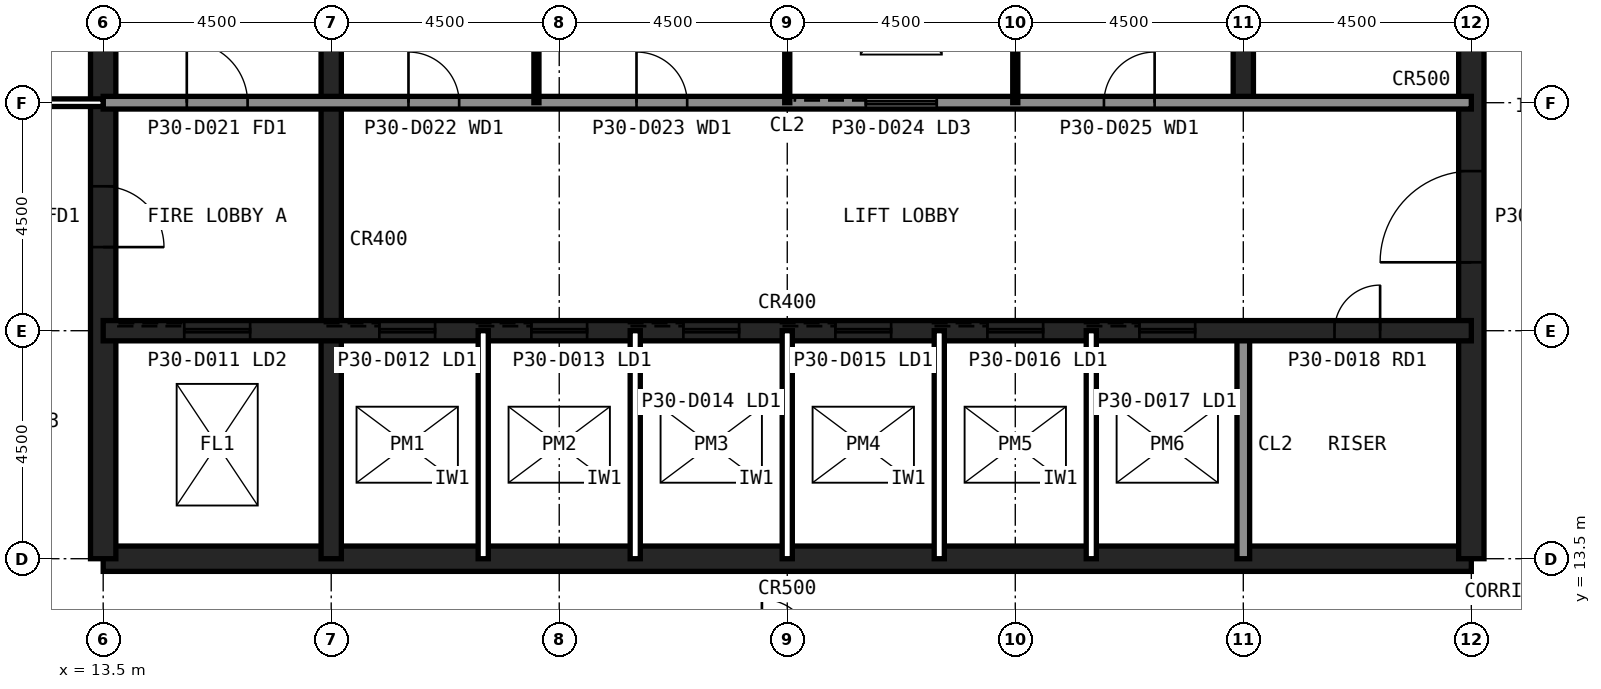
"""IFC4 building model, lengths in metres.
Left out: names, types, materials, properties, quantities, classifications, styles, units other than length and angle.
Written with IfcOpenShell. Run it as: python <this file> out.ifc"""

import sys

from ifc_helpers import new_model, si_unit, direction, frame, frame_2d, origin, place, context, subcontext, project, spatial, rectangle, extrude, element, fill, save


model = new_model("IFC4")
c1 = context("Model", 3, precision=1e-05, world=origin(), true_north=direction((0.0, 1.0)))
c2 = subcontext(c1, "Body", "Model", "MODEL_VIEW")
j1 = project(units=[si_unit("LENGTHUNIT", "METRE"), si_unit("PLANEANGLEUNIT", "RADIAN")], contexts=[c1])
p1 = place(None, origin())
s1 = spatial("IfcSite", under=j1, at=p1, CompositionType="ELEMENT")
p2 = place(p1, origin())
s2 = spatial("IfcBuilding", under=s1, at=p2, CompositionType="ELEMENT")
p3 = place(p2, frame((0.0, 0.0, 127.6)))
s3 = spatial("IfcBuildingStorey", under=s2, at=p3, CompositionType="ELEMENT", Elevation=127.6)
p4 = place(p3, frame((13.5, 13.5, 0.0), z_axis=(0.0, 0.0, 1.0), x_axis=(1.0, 0.0, 0.0)))
e1 = element("IfcWall", 1, at=p4, inside=s3, PredefinedType="SHEAR", context=c2, shape_type="SweptSolid", body=[
    extrude(rectangle(XDim=27.0, YDim=0.5, at=frame_2d((13.5, 0.0))), origin(), (0.0, 0.0, 1.0), 4.0),
])
p5 = place(p3, frame((40.5, 13.5, 0.0), z_axis=(0.0, 0.0, 1.0), x_axis=(0.0, 1.0, 0.0)))
e2 = element("IfcWall", 2, at=p5, inside=s3, PredefinedType="SHEAR", context=c2, shape_type="SweptSolid", body=[
    extrude(rectangle(XDim=27.0, YDim=0.5, at=frame_2d((13.5, 0.0))), origin(), (0.0, 0.0, 1.0), 4.0),
])
p6 = place(p5, frame((5.85, 0.0, 0.0)))
e3 = element("IfcOpeningElement", 3, at=p6, cuts=e2, PredefinedType="OPENING", context=c2, shape_type="SweptSolid", body=[
    extrude(rectangle(XDim=1.8, YDim=2.1, at=frame_2d((0.9, 1.05))), frame((0.0, 0.26, 0.0), z_axis=(0.0, -1.0, 0.0), x_axis=(1.0, 0.0, 0.0)), (0.0, 0.0, 1.0), 0.52),
])
p7 = place(p5, frame((19.65, 0.0, 0.0)))
e4 = element("IfcOpeningElement", 4, at=p7, cuts=e2, PredefinedType="OPENING", context=c2, shape_type="SweptSolid", body=[
    extrude(rectangle(XDim=1.2, YDim=2.1, at=frame_2d((0.6, 1.05))), frame((0.0, 0.26, 0.0), z_axis=(0.0, -1.0, 0.0), x_axis=(1.0, 0.0, 0.0)), (0.0, 0.0, 1.0), 0.52),
])
p8 = place(p3, frame((13.5, 40.5, 0.0), z_axis=(0.0, 0.0, 1.0), x_axis=(0.0, -1.0, 0.0)))
e5 = element("IfcWall", 5, at=p8, inside=s3, PredefinedType="SHEAR", context=c2, shape_type="SweptSolid", body=[
    extrude(rectangle(XDim=27.0, YDim=0.5, at=frame_2d((13.5, 0.0))), origin(), (0.0, 0.0, 1.0), 4.0),
])
p9 = place(p8, frame((19.65, 0.0, 0.0)))
e6 = element("IfcOpeningElement", 6, at=p9, cuts=e5, PredefinedType="OPENING", context=c2, shape_type="SweptSolid", body=[
    extrude(rectangle(XDim=1.2, YDim=2.1, at=frame_2d((0.6, 1.05))), frame((0.0, 0.26, 0.0), z_axis=(0.0, -1.0, 0.0), x_axis=(1.0, 0.0, 0.0)), (0.0, 0.0, 1.0), 0.52),
])
p10 = place(p8, frame((5.85, 0.0, 0.0)))
e7 = element("IfcOpeningElement", 7, at=p10, cuts=e5, PredefinedType="OPENING", context=c2, shape_type="SweptSolid", body=[
    extrude(rectangle(XDim=1.8, YDim=2.1, at=frame_2d((0.9, 1.05))), frame((0.0, 0.26, 0.0), z_axis=(0.0, -1.0, 0.0), x_axis=(1.0, 0.0, 0.0)), (0.0, 0.0, 1.0), 0.52),
])
p11 = place(p3, frame((18.0, 13.5, 0.0), z_axis=(0.0, 0.0, 1.0), x_axis=(0.0, 1.0, 0.0)))
e8 = element("IfcWall", 8, at=p11, inside=s3, PredefinedType="SHEAR", context=c2, shape_type="SweptSolid", body=[
    extrude(rectangle(XDim=18.0, YDim=0.4, at=frame_2d((9.0, 0.0))), origin(), (0.0, 0.0, 1.0), 4.0),
])
p12 = place(p3, frame((36.0, 13.5, 0.0), z_axis=(0.0, 0.0, 1.0), x_axis=(0.0, 1.0, 0.0)))
e9 = element("IfcWall", 9, at=p12, inside=s3, PredefinedType="SOLIDWALL", context=c2, shape_type="SweptSolid", body=[
    extrude(rectangle(XDim=4.5, YDim=0.25, at=frame_2d((2.25, 0.0))), origin(), (0.0, 0.0, 1.0), 3.84),
])
p13 = place(p3, frame((36.0, 22.5, 0.0), z_axis=(0.0, 0.0, 1.0), x_axis=(0.0, 1.0, 0.0)))
e10 = element("IfcWall", 10, at=p13, inside=s3, PredefinedType="SHEAR", context=c2, shape_type="SweptSolid", body=[
    extrude(rectangle(XDim=18.0, YDim=0.4, at=frame_2d((9.0, 0.0))), origin(), (0.0, 0.0, 1.0), 4.0),
])
p14 = place(p3, frame((13.5, 18.0, 0.0), z_axis=(0.0, 0.0, 1.0), x_axis=(1.0, 0.0, 0.0)))
e11 = element("IfcWall", 11, at=p14, inside=s3, PredefinedType="SHEAR", context=c2, shape_type="SweptSolid", body=[
    extrude(rectangle(XDim=27.0, YDim=0.4, at=frame_2d((13.5, 0.0))), origin(), (0.0, 0.0, 1.0), 4.0),
])
p15 = place(p14, frame((24.3, 0.0, 0.0)))
e12 = element("IfcOpeningElement", 12, at=p15, cuts=e11, PredefinedType="OPENING", context=c2, shape_type="SweptSolid", body=[
    extrude(rectangle(XDim=0.9, YDim=2.1, at=frame_2d((0.45, 1.05))), frame((0.0, 0.21, 0.0), z_axis=(0.0, -1.0, 0.0), x_axis=(1.0, 0.0, 0.0)), (0.0, 0.0, 1.0), 0.42),
])
p16 = place(p14, frame((5.45, 0.0, 0.0)))
e13 = element("IfcOpeningElement", 13, at=p16, cuts=e11, PredefinedType="OPENING", context=c2, shape_type="SweptSolid", body=[
    extrude(rectangle(XDim=1.1, YDim=2.1, at=frame_2d((0.55, 1.05))), frame((0.0, 0.21, 0.0), z_axis=(0.0, -1.0, 0.0), x_axis=(1.0, 0.0, 0.0)), (0.0, 0.0, 1.0), 0.42),
])
p17 = place(p14, frame((8.45, 0.0, 0.0)))
e14 = element("IfcOpeningElement", 14, at=p17, cuts=e11, PredefinedType="OPENING", context=c2, shape_type="SweptSolid", body=[
    extrude(rectangle(XDim=1.1, YDim=2.1, at=frame_2d((0.55, 1.05))), frame((0.0, 0.21, 0.0), z_axis=(0.0, -1.0, 0.0), x_axis=(1.0, 0.0, 0.0)), (0.0, 0.0, 1.0), 0.42),
])
p18 = place(p14, frame((11.45, 0.0, 0.0)))
e15 = element("IfcOpeningElement", 15, at=p18, cuts=e11, PredefinedType="OPENING", context=c2, shape_type="SweptSolid", body=[
    extrude(rectangle(XDim=1.1, YDim=2.1, at=frame_2d((0.55, 1.05))), frame((0.0, 0.21, 0.0), z_axis=(0.0, -1.0, 0.0), x_axis=(1.0, 0.0, 0.0)), (0.0, 0.0, 1.0), 0.42),
])
p19 = place(p14, frame((14.45, 0.0, 0.0)))
e16 = element("IfcOpeningElement", 16, at=p19, cuts=e11, PredefinedType="OPENING", context=c2, shape_type="SweptSolid", body=[
    extrude(rectangle(XDim=1.1, YDim=2.1, at=frame_2d((0.55, 1.05))), frame((0.0, 0.21, 0.0), z_axis=(0.0, -1.0, 0.0), x_axis=(1.0, 0.0, 0.0)), (0.0, 0.0, 1.0), 0.42),
])
p20 = place(p14, frame((17.45, 0.0, 0.0)))
e17 = element("IfcOpeningElement", 17, at=p20, cuts=e11, PredefinedType="OPENING", context=c2, shape_type="SweptSolid", body=[
    extrude(rectangle(XDim=1.1, YDim=2.1, at=frame_2d((0.55, 1.05))), frame((0.0, 0.21, 0.0), z_axis=(0.0, -1.0, 0.0), x_axis=(1.0, 0.0, 0.0)), (0.0, 0.0, 1.0), 0.42),
])
p21 = place(p14, frame((20.45, 0.0, 0.0)))
e18 = element("IfcOpeningElement", 18, at=p21, cuts=e11, PredefinedType="OPENING", context=c2, shape_type="SweptSolid", body=[
    extrude(rectangle(XDim=1.1, YDim=2.1, at=frame_2d((0.55, 1.05))), frame((0.0, 0.21, 0.0), z_axis=(0.0, -1.0, 0.0), x_axis=(1.0, 0.0, 0.0)), (0.0, 0.0, 1.0), 0.42),
])
p22 = place(p14, frame((1.6, 0.0, 0.0)))
e19 = element("IfcOpeningElement", 19, at=p22, cuts=e11, PredefinedType="OPENING", context=c2, shape_type="SweptSolid", body=[
    extrude(rectangle(XDim=1.3, YDim=2.2, at=frame_2d((0.65, 1.1))), frame((0.0, 0.21, 0.0), z_axis=(0.0, -1.0, 0.0), x_axis=(1.0, 0.0, 0.0)), (0.0, 0.0, 1.0), 0.42),
])
p23 = place(p3, frame((13.5, 22.5, 0.0), z_axis=(0.0, 0.0, 1.0), x_axis=(1.0, 0.0, 0.0)))
e20 = element("IfcWall", 20, at=p23, inside=s3, PredefinedType="SOLIDWALL", context=c2, shape_type="SweptSolid", body=[
    extrude(rectangle(XDim=27.0, YDim=0.25, at=frame_2d((13.5, 0.0))), origin(), (0.0, 0.0, 1.0), 3.84),
])
p24 = place(p23, frame((1.65, 0.0, 0.0)))
e21 = element("IfcOpeningElement", 21, at=p24, cuts=e20, PredefinedType="OPENING", context=c2, shape_type="SweptSolid", body=[
    extrude(rectangle(XDim=1.2, YDim=2.1, at=frame_2d((0.6, 1.05))), frame((0.0, 0.135, 0.0), z_axis=(0.0, -1.0, 0.0), x_axis=(1.0, 0.0, 0.0)), (0.0, 0.0, 1.0), 0.27),
])
p25 = place(p23, frame((6.025, 0.0, 0.0)))
e22 = element("IfcOpeningElement", 22, at=p25, cuts=e20, PredefinedType="OPENING", context=c2, shape_type="SweptSolid", body=[
    extrude(rectangle(XDim=1.0, YDim=2.1, at=frame_2d((0.5, 1.05))), frame((0.0, 0.135, 0.0), z_axis=(0.0, -1.0, 0.0), x_axis=(1.0, 0.0, 0.0)), (0.0, 0.0, 1.0), 0.27),
])
p26 = place(p23, frame((10.525, 0.0, 0.0)))
e23 = element("IfcOpeningElement", 23, at=p26, cuts=e20, PredefinedType="OPENING", context=c2, shape_type="SweptSolid", body=[
    extrude(rectangle(XDim=1.0, YDim=2.1, at=frame_2d((0.5, 1.05))), frame((0.0, 0.135, 0.0), z_axis=(0.0, -1.0, 0.0), x_axis=(1.0, 0.0, 0.0)), (0.0, 0.0, 1.0), 0.27),
])
p27 = place(p23, frame((19.75, 0.0, 0.0)))
e24 = element("IfcOpeningElement", 24, at=p27, cuts=e20, PredefinedType="OPENING", context=c2, shape_type="SweptSolid", body=[
    extrude(rectangle(XDim=1.0, YDim=2.1, at=frame_2d((0.5, 1.05))), frame((0.0, 0.135, 0.0), z_axis=(0.0, -1.0, 0.0), x_axis=(1.0, 0.0, 0.0)), (0.0, 0.0, 1.0), 0.27),
])
p28 = place(p23, frame((15.05, 0.0, 0.0)))
e25 = element("IfcOpeningElement", 25, at=p28, cuts=e20, PredefinedType="OPENING", context=c2, shape_type="SweptSolid", body=[
    extrude(rectangle(XDim=1.4, YDim=2.4, at=frame_2d((0.7, 1.2))), frame((0.0, 0.135, 0.0), z_axis=(0.0, -1.0, 0.0), x_axis=(1.0, 0.0, 0.0)), (0.0, 0.0, 1.0), 0.27),
])
for number, where, z_axis, x_axis in (
    (26, (21.0, 13.5, 0.0), (0.0, 0.0, 1.0), (0.0, 1.0, 0.0)),
    (27, (24.0, 13.5, 0.0), (0.0, 0.0, 1.0), (0.0, 1.0, 0.0)),
    (28, (27.0, 13.5, 0.0), (0.0, 0.0, 1.0), (0.0, 1.0, 0.0)),
    (29, (30.0, 13.5, 0.0), (0.0, 0.0, 1.0), (0.0, 1.0, 0.0)),
    (30, (33.0, 13.5, 0.0), (0.0, 0.0, 1.0), (0.0, 1.0, 0.0)),
):
    element("IfcWall", number, at=place(p3, frame(where, z_axis=z_axis, x_axis=x_axis)), inside=s3, PredefinedType="PARTITIONING", context=c2, shape_type="SweptSolid", body=[
        extrude(rectangle(XDim=4.5, YDim=0.2, at=frame_2d((2.25, 0.0))), origin(), (0.0, 0.0, 1.0), 3.84),
    ])
for number, where, z_axis, x_axis in (
    (31, (22.05, 22.5, 0.0), (0.0, 0.0, 1.0), (0.0, 1.0, 0.0)),
    (32, (27.0, 22.5, 0.0), (0.0, 0.0, 1.0), (0.0, 1.0, 0.0)),
    (33, (31.5, 22.5, 0.0), (0.0, 0.0, 1.0), (0.0, 1.0, 0.0)),
):
    element("IfcWall", number, at=place(p3, frame(where, z_axis=z_axis, x_axis=x_axis)), inside=s3, PredefinedType="PLUMBINGWALL", context=c2, shape_type="SweptSolid", body=[
        extrude(rectangle(XDim=9.0, YDim=0.1, at=frame_2d((4.5, 0.0))), origin(), (0.0, 0.0, 1.0), 3.84),
    ])
p29 = place(p3, frame((6.75, 22.5, 0.0), z_axis=(0.0, 0.0, 1.0), x_axis=(1.0, 0.0, 0.0)))
e34 = element("IfcWall", 34, at=p29, inside=s3, PredefinedType="PARTITIONING", context=c2, shape_type="SweptSolid", body=[
    extrude(rectangle(XDim=6.75, YDim=0.15, at=frame_2d((3.375, 0.0))), origin(), (0.0, 0.0, 1.0), 2.989),
])
p30 = place(p29, frame((2.875, 0.0, 0.0)))
e35 = element("IfcOpeningElement", 35, at=p30, cuts=e34, PredefinedType="OPENING", context=c2, shape_type="SweptSolid", body=[
    extrude(rectangle(XDim=1.0, YDim=2.1, at=frame_2d((0.5, 1.05))), frame((0.0, 0.085, 0.0), z_axis=(0.0, -1.0, 0.0), x_axis=(1.0, 0.0, 0.0)), (0.0, 0.0, 1.0), 0.17),
])
p31 = place(p9, origin())
e36 = element("IfcDoor", 36, at=p31, inside=s3, OperationType="SINGLE_SWING_RIGHT", PredefinedType="DOOR", context=c2, shape_type="SweptSolid", body=[
    extrude(rectangle(XDim=1.2, YDim=2.1, at=frame_2d((0.6, 1.05))), frame((0.0, 0.025, 0.0), z_axis=(0.0, -1.0, 0.0), x_axis=(1.0, 0.0, 0.0)), (0.0, 0.0, 1.0), 0.05),
])
fill(e6, e36)
p32 = place(p6, origin())
e37 = element("IfcDoor", 37, at=p32, inside=s3, OperationType="SINGLE_SWING_LEFT", PredefinedType="DOOR", context=c2, shape_type="SweptSolid", body=[
    extrude(rectangle(XDim=1.8, YDim=2.1, at=frame_2d((0.9, 1.05))), frame((0.0, 0.025, 0.0), z_axis=(0.0, -1.0, 0.0), x_axis=(1.0, 0.0, 0.0)), (0.0, 0.0, 1.0), 0.05),
])
fill(e3, e37)
p33 = place(p24, origin())
e38 = element("IfcDoor", 38, at=p33, inside=s3, OperationType="SINGLE_SWING_LEFT", PredefinedType="DOOR", context=c2, shape_type="SweptSolid", body=[
    extrude(rectangle(XDim=1.2, YDim=2.1, at=frame_2d((0.6, 1.05))), frame((0.0, 0.025, 0.0), z_axis=(0.0, -1.0, 0.0), x_axis=(1.0, 0.0, 0.0)), (0.0, 0.0, 1.0), 0.05),
])
fill(e21, e38)
p34 = place(p25, origin())
e39 = element("IfcDoor", 39, at=p34, inside=s3, OperationType="SINGLE_SWING_LEFT", PredefinedType="DOOR", context=c2, shape_type="SweptSolid", body=[
    extrude(rectangle(XDim=1.0, YDim=2.1, at=frame_2d((0.5, 1.05))), frame((0.0, 0.025, 0.0), z_axis=(0.0, -1.0, 0.0), x_axis=(1.0, 0.0, 0.0)), (0.0, 0.0, 1.0), 0.05),
])
fill(e22, e39)
p35 = place(p26, origin())
e40 = element("IfcDoor", 40, at=p35, inside=s3, OperationType="SINGLE_SWING_LEFT", PredefinedType="DOOR", context=c2, shape_type="SweptSolid", body=[
    extrude(rectangle(XDim=1.0, YDim=2.1, at=frame_2d((0.5, 1.05))), frame((0.0, 0.025, 0.0), z_axis=(0.0, -1.0, 0.0), x_axis=(1.0, 0.0, 0.0)), (0.0, 0.0, 1.0), 0.05),
])
fill(e23, e40)
p36 = place(p27, origin())
e41 = element("IfcDoor", 41, at=p36, inside=s3, OperationType="SINGLE_SWING_RIGHT", PredefinedType="DOOR", context=c2, shape_type="SweptSolid", body=[
    extrude(rectangle(XDim=1.0, YDim=2.1, at=frame_2d((0.5, 1.05))), frame((0.0, 0.025, 0.0), z_axis=(0.0, -1.0, 0.0), x_axis=(1.0, 0.0, 0.0)), (0.0, 0.0, 1.0), 0.05),
])
fill(e24, e41)
p37 = place(p15, origin())
e42 = element("IfcDoor", 42, at=p37, inside=s3, OperationType="SINGLE_SWING_RIGHT", PredefinedType="DOOR", context=c2, shape_type="SweptSolid", body=[
    extrude(rectangle(XDim=0.9, YDim=2.1, at=frame_2d((0.45, 1.05))), frame((0.0, 0.025, 0.0), z_axis=(0.0, -1.0, 0.0), x_axis=(1.0, 0.0, 0.0)), (0.0, 0.0, 1.0), 0.05),
])
fill(e12, e42)
p38 = place(p16, origin())
e43 = element("IfcDoor", 43, at=p38, inside=s3, OperationType="SLIDING_TO_LEFT", PredefinedType="DOOR", context=c2, shape_type="SweptSolid", body=[
    extrude(rectangle(XDim=1.1, YDim=2.1, at=frame_2d((0.55, 1.05))), frame((0.0, 0.025, 0.0), z_axis=(0.0, -1.0, 0.0), x_axis=(1.0, 0.0, 0.0)), (0.0, 0.0, 1.0), 0.05),
])
fill(e13, e43)
p39 = place(p17, origin())
e44 = element("IfcDoor", 44, at=p39, inside=s3, OperationType="SLIDING_TO_LEFT", PredefinedType="DOOR", context=c2, shape_type="SweptSolid", body=[
    extrude(rectangle(XDim=1.1, YDim=2.1, at=frame_2d((0.55, 1.05))), frame((0.0, 0.025, 0.0), z_axis=(0.0, -1.0, 0.0), x_axis=(1.0, 0.0, 0.0)), (0.0, 0.0, 1.0), 0.05),
])
fill(e14, e44)
p40 = place(p18, origin())
e45 = element("IfcDoor", 45, at=p40, inside=s3, OperationType="SLIDING_TO_LEFT", PredefinedType="DOOR", context=c2, shape_type="SweptSolid", body=[
    extrude(rectangle(XDim=1.1, YDim=2.1, at=frame_2d((0.55, 1.05))), frame((0.0, 0.025, 0.0), z_axis=(0.0, -1.0, 0.0), x_axis=(1.0, 0.0, 0.0)), (0.0, 0.0, 1.0), 0.05),
])
fill(e15, e45)
p41 = place(p19, origin())
e46 = element("IfcDoor", 46, at=p41, inside=s3, OperationType="SLIDING_TO_LEFT", PredefinedType="DOOR", context=c2, shape_type="SweptSolid", body=[
    extrude(rectangle(XDim=1.1, YDim=2.1, at=frame_2d((0.55, 1.05))), frame((0.0, 0.025, 0.0), z_axis=(0.0, -1.0, 0.0), x_axis=(1.0, 0.0, 0.0)), (0.0, 0.0, 1.0), 0.05),
])
fill(e16, e46)
p42 = place(p20, origin())
e47 = element("IfcDoor", 47, at=p42, inside=s3, OperationType="SLIDING_TO_LEFT", PredefinedType="DOOR", context=c2, shape_type="SweptSolid", body=[
    extrude(rectangle(XDim=1.1, YDim=2.1, at=frame_2d((0.55, 1.05))), frame((0.0, 0.025, 0.0), z_axis=(0.0, -1.0, 0.0), x_axis=(1.0, 0.0, 0.0)), (0.0, 0.0, 1.0), 0.05),
])
fill(e17, e47)
p43 = place(p21, origin())
e48 = element("IfcDoor", 48, at=p43, inside=s3, OperationType="SLIDING_TO_LEFT", PredefinedType="DOOR", context=c2, shape_type="SweptSolid", body=[
    extrude(rectangle(XDim=1.1, YDim=2.1, at=frame_2d((0.55, 1.05))), frame((0.0, 0.025, 0.0), z_axis=(0.0, -1.0, 0.0), x_axis=(1.0, 0.0, 0.0)), (0.0, 0.0, 1.0), 0.05),
])
fill(e18, e48)
p44 = place(p22, origin())
e49 = element("IfcDoor", 49, at=p44, inside=s3, OperationType="SLIDING_TO_LEFT", PredefinedType="DOOR", context=c2, shape_type="SweptSolid", body=[
    extrude(rectangle(XDim=1.3, YDim=2.2, at=frame_2d((0.65, 1.1))), frame((0.0, 0.025, 0.0), z_axis=(0.0, -1.0, 0.0), x_axis=(1.0, 0.0, 0.0)), (0.0, 0.0, 1.0), 0.05),
])
fill(e19, e49)
p45 = place(p28, origin())
e50 = element("IfcDoor", 50, at=p45, inside=s3, OperationType="SLIDING_TO_LEFT", PredefinedType="DOOR", context=c2, shape_type="SweptSolid", body=[
    extrude(rectangle(XDim=1.4, YDim=2.4, at=frame_2d((0.7, 1.2))), frame((0.0, 0.025, 0.0), z_axis=(0.0, -1.0, 0.0), x_axis=(1.0, 0.0, 0.0)), (0.0, 0.0, 1.0), 0.05),
])
fill(e25, e50)
save(model, sys.argv[1])
